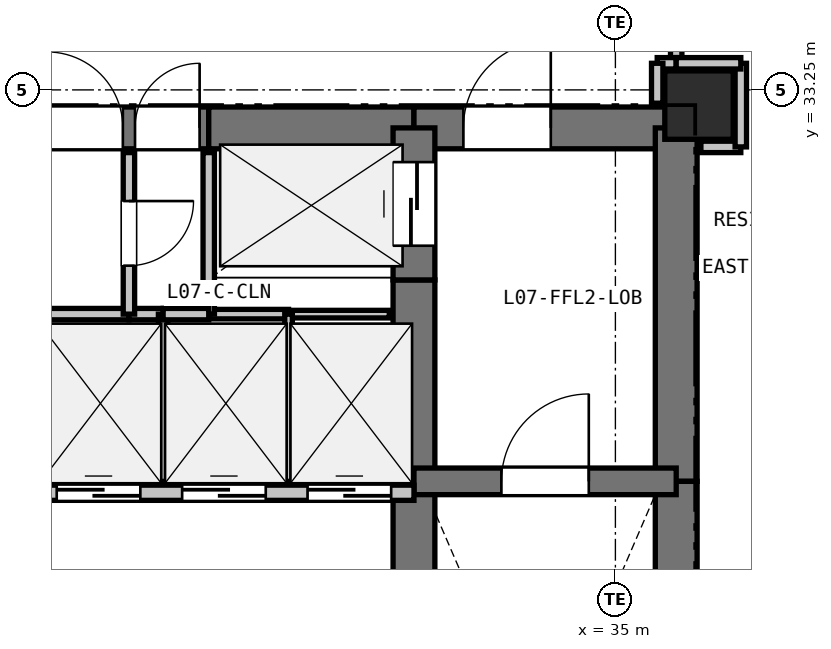
"""IFC4 building model, lengths in metres.
Left out: names, types, materials, properties, quantities, classifications, styles, units other than length and angle.
Written with IfcOpenShell. Run it as: python <this file> out.ifc"""

import sys

from ifc_helpers import new_model, si_unit, direction, frame, frame_2d, origin, origin_2d, place, context, subcontext, project, spatial, rectangle, extrude, element, fill, save


model = new_model("IFC4")
c1 = context("Model", 3, precision=1e-05, world=origin(), true_north=direction((0.0, 1.0)))
c2 = subcontext(c1, "Body", "Model", "MODEL_VIEW")
j1 = project(units=[si_unit("LENGTHUNIT", "METRE"), si_unit("PLANEANGLEUNIT", "RADIAN")], contexts=[c1])
p1 = place(None, origin())
s1 = spatial("IfcSite", under=j1, at=p1, CompositionType="ELEMENT")
p2 = place(p1, origin())
s2 = spatial("IfcBuilding", under=s1, at=p2, CompositionType="ELEMENT")
p3 = place(p2, frame((0.0, 0.0, 29.1)))
s3 = spatial("IfcBuildingStorey", under=s2, at=p3, CompositionType="ELEMENT", Elevation=29.1)
p4 = place(p3, frame((36.1, 33.05, 0.0), z_axis=(0.0, 0.0, 1.0), x_axis=(1.0, 0.0, 0.0)))
e1 = element("IfcColumn", 1, at=p4, inside=s3, PredefinedType="COLUMN", context=c2, shape_type="SweptSolid", body=[
    extrude(rectangle(XDim=0.9, YDim=0.9, at=origin_2d()), origin(), (0.0, 0.0, 1.0), 3.3),
])
p5 = place(p3, frame((27.4, 32.75, 0.0), z_axis=(0.0, 0.0, 1.0), x_axis=(1.0, 0.0, 0.0)))
e2 = element("IfcWall", 2, at=p5, inside=s3, PredefinedType="SHEAR", context=c2, shape_type="SweptSolid", body=[
    extrude(rectangle(XDim=2.25, YDim=0.55, at=frame_2d((1.125, 0.0))), origin(), (0.0, 0.0, 1.0), 3.04),
])
p6 = place(p5, frame((0.12, 0.0, 0.0)))
e3 = element("IfcOpeningElement", 3, at=p6, cuts=e2, PredefinedType="OPENING", context=c2, shape_type="SweptSolid", body=[
    extrude(rectangle(XDim=1.0, YDim=2.15, at=frame_2d((0.5, 1.075))), frame((0.0, 0.285, 0.0), z_axis=(0.0, -1.0, 0.0), x_axis=(1.0, 0.0, 0.0)), (0.0, 0.0, 1.0), 0.57),
])
p7 = place(p5, frame((1.28, 0.0, 0.0)))
e4 = element("IfcOpeningElement", 4, at=p7, cuts=e2, PredefinedType="OPENING", context=c2, shape_type="SweptSolid", body=[
    extrude(rectangle(XDim=0.85, YDim=2.1, at=frame_2d((0.425, 1.05))), frame((0.0, 0.285, 0.0), z_axis=(0.0, -1.0, 0.0), x_axis=(1.0, 0.0, 0.0)), (0.0, 0.0, 1.0), 0.57),
])
p8 = place(p3, frame((29.65, 32.75, 0.0), z_axis=(0.0, 0.0, 1.0), x_axis=(1.0, 0.0, 0.0)))
e5 = element("IfcWall", 5, at=p8, inside=s3, PredefinedType="SHEAR", context=c2, shape_type="SweptSolid", body=[
    extrude(rectangle(XDim=2.7, YDim=0.55, at=frame_2d((1.35, 0.0))), origin(), (0.0, 0.0, 1.0), 3.04),
])
p9 = place(p3, frame((32.35, 32.75, 0.0), z_axis=(0.0, 0.0, 1.0), x_axis=(1.0, 0.0, 0.0)))
e6 = element("IfcWall", 6, at=p9, inside=s3, PredefinedType="SHEAR", context=c2, shape_type="SweptSolid", body=[
    extrude(rectangle(XDim=3.45, YDim=0.55, at=frame_2d((1.725, 0.0))), origin(), (0.0, 0.0, 1.0), 3.04),
])
p10 = place(p9, frame((0.65, 0.0, 0.0)))
e7 = element("IfcOpeningElement", 7, at=p10, cuts=e6, PredefinedType="OPENING", context=c2, shape_type="SweptSolid", body=[
    extrude(rectangle(XDim=1.15, YDim=2.15, at=frame_2d((0.575, 1.075))), frame((0.0, 0.285, 0.0), z_axis=(0.0, -1.0, 0.0), x_axis=(1.0, 0.0, 0.0)), (0.0, 0.0, 1.0), 0.57),
])
p11 = place(p3, frame((35.8, 32.75, 0.0), z_axis=(0.0, 0.0, 1.0), x_axis=(0.0, -1.0, 0.0)))
e8 = element("IfcWall", 8, at=p11, inside=s3, PredefinedType="SHEAR", context=c2, shape_type="SweptSolid", body=[
    extrude(rectangle(XDim=4.65, YDim=0.55, at=frame_2d((2.325, 0.0))), origin(), (0.0, 0.0, 1.0), 3.04),
])
p12 = place(p3, frame((35.8, 28.1, 0.0), z_axis=(0.0, 0.0, 1.0), x_axis=(0.0, -1.0, 0.0)))
e9 = element("IfcWall", 9, at=p12, inside=s3, PredefinedType="SHEAR", context=c2, shape_type="SweptSolid", body=[
    extrude(rectangle(XDim=7.35, YDim=0.55, at=frame_2d((3.675, 0.0))), origin(), (0.0, 0.0, 1.0), 3.04),
])
p13 = place(p3, frame((32.35, 25.55, 0.0), z_axis=(0.0, 0.0, 1.0), x_axis=(0.0, 1.0, 0.0)))
e10 = element("IfcWall", 10, at=p13, inside=s3, PredefinedType="SHEAR", context=c2, shape_type="SweptSolid", body=[
    extrude(rectangle(XDim=2.4, YDim=0.55, at=frame_2d((1.2, 0.0))), origin(), (0.0, 0.0, 1.0), 3.04),
])
p14 = place(p3, frame((32.35, 27.95, 0.0), z_axis=(0.0, 0.0, 1.0), x_axis=(0.0, 1.0, 0.0)))
e11 = element("IfcWall", 11, at=p14, inside=s3, PredefinedType="SHEAR", context=c2, shape_type="SweptSolid", body=[
    extrude(rectangle(XDim=2.8, YDim=0.55, at=frame_2d((1.4, 0.0))), origin(), (0.0, 0.0, 1.0), 3.04),
])
p15 = place(p3, frame((32.35, 30.75, 0.0), z_axis=(0.0, 0.0, 1.0), x_axis=(0.0, 1.0, 0.0)))
e12 = element("IfcWall", 12, at=p15, inside=s3, PredefinedType="SHEAR", context=c2, shape_type="SweptSolid", body=[
    extrude(rectangle(XDim=2.0, YDim=0.55, at=frame_2d((1.0, 0.0))), origin(), (0.0, 0.0, 1.0), 3.04),
])
p16 = place(p15, frame((0.45, 0.0, 0.0)))
e13 = element("IfcOpeningElement", 13, at=p16, cuts=e12, PredefinedType="OPENING", context=c2, shape_type="SweptSolid", body=[
    extrude(rectangle(XDim=1.1, YDim=2.15, at=frame_2d((0.55, 1.075))), frame((0.0, 0.285, 0.0), z_axis=(0.0, -1.0, 0.0), x_axis=(1.0, 0.0, 0.0)), (0.0, 0.0, 1.0), 0.57),
])
p17 = place(p3, frame((32.35, 28.1, 0.0), z_axis=(0.0, 0.0, 1.0), x_axis=(1.0, 0.0, 0.0)))
e14 = element("IfcWall", 14, at=p17, inside=s3, PredefinedType="SHEAR", context=c2, shape_type="SweptSolid", body=[
    extrude(rectangle(XDim=3.45, YDim=0.35, at=frame_2d((1.725, 0.0))), origin(), (0.0, 0.0, 1.0), 3.04),
])
p18 = place(p17, frame((1.15, 0.0, 0.0)))
e15 = element("IfcOpeningElement", 15, at=p18, cuts=e14, PredefinedType="OPENING", context=c2, shape_type="SweptSolid", body=[
    extrude(rectangle(XDim=1.15, YDim=2.15, at=frame_2d((0.575, 1.075))), frame((0.0, 0.185, 0.0), z_axis=(0.0, -1.0, 0.0), x_axis=(1.0, 0.0, 0.0)), (0.0, 0.0, 1.0), 0.37),
])
p19 = place(p3, frame((27.4, 27.95, 0.0), z_axis=(0.0, 0.0, 1.0), x_axis=(1.0, 0.0, 0.0)))
e16 = element("IfcWall", 16, at=p19, inside=s3, PredefinedType="PARTITIONING", context=c2, shape_type="SweptSolid", body=[
    extrude(rectangle(XDim=4.95, YDim=0.2, at=frame_2d((2.475, 0.0))), origin(), (0.0, 0.0, 1.0), 3.04),
])
p20 = place(p19, frame((0.25, 0.0, 0.0)))
e17 = element("IfcOpeningElement", 17, at=p20, cuts=e16, PredefinedType="OPENING", context=c2, shape_type="SweptSolid", body=[
    extrude(rectangle(XDim=1.1, YDim=2.15, at=frame_2d((0.55, 1.075))), frame((0.0, 0.11, 0.0), z_axis=(0.0, -1.0, 0.0), x_axis=(1.0, 0.0, 0.0)), (0.0, 0.0, 1.0), 0.22),
])
p21 = place(p19, frame((1.9, 0.0, 0.0)))
e18 = element("IfcOpeningElement", 18, at=p21, cuts=e16, PredefinedType="OPENING", context=c2, shape_type="SweptSolid", body=[
    extrude(rectangle(XDim=1.1, YDim=2.15, at=frame_2d((0.55, 1.075))), frame((0.0, 0.11, 0.0), z_axis=(0.0, -1.0, 0.0), x_axis=(1.0, 0.0, 0.0)), (0.0, 0.0, 1.0), 0.22),
])
p22 = place(p19, frame((3.55, 0.0, 0.0)))
e19 = element("IfcOpeningElement", 19, at=p22, cuts=e16, PredefinedType="OPENING", context=c2, shape_type="SweptSolid", body=[
    extrude(rectangle(XDim=1.1, YDim=2.15, at=frame_2d((0.55, 1.075))), frame((0.0, 0.11, 0.0), z_axis=(0.0, -1.0, 0.0), x_axis=(1.0, 0.0, 0.0)), (0.0, 0.0, 1.0), 0.22),
])
p23 = place(p3, frame((32.025, 30.3, 0.0), z_axis=(0.0, 0.0, 1.0), x_axis=(-1.0, 0.0, 0.0)))
e20 = element("IfcWall", 20, at=p23, inside=s3, PredefinedType="PARTITIONING", context=c2, shape_type="SweptSolid", body=[
    extrude(rectangle(XDim=1.325, YDim=0.1, at=frame_2d((0.663, 0.0))), origin(), (0.0, 0.0, 1.0), 3.04),
])
p24 = place(p3, frame((30.7, 30.3, 0.0), z_axis=(0.0, 0.0, 1.0), x_axis=(-1.0, 0.0, 0.0)))
e21 = element("IfcWall", 21, at=p24, inside=s3, PredefinedType="PARTITIONING", context=c2, shape_type="SweptSolid", body=[
    extrude(rectangle(XDim=1.05, YDim=0.125, at=frame_2d((0.525, 0.0))), origin(), (0.0, 0.0, 1.0), 3.04),
])
p25 = place(p3, frame((29.65, 30.3, 0.0), z_axis=(0.0, 0.0, 1.0), x_axis=(0.0, 1.0, 0.0)))
e22 = element("IfcWall", 22, at=p25, inside=s3, PredefinedType="PARTITIONING", context=c2, shape_type="SweptSolid", body=[
    extrude(rectangle(XDim=2.125, YDim=0.15, at=frame_2d((1.062, 0.0))), origin(), (0.0, 0.0, 1.0), 3.04),
])
p26 = place(p3, frame((27.4, 30.3, 0.0), z_axis=(0.0, 0.0, 1.0), x_axis=(1.0, 0.0, 0.0)))
e23 = element("IfcWall", 23, at=p26, inside=s3, PredefinedType="PARTITIONING", context=c2, shape_type="SweptSolid", body=[
    extrude(rectangle(XDim=1.2, YDim=0.15, at=frame_2d((0.6, 0.0))), origin(), (0.0, 0.0, 1.0), 3.04),
])
p27 = place(p3, frame((28.6, 30.3, 0.0), z_axis=(0.0, 0.0, 1.0), x_axis=(1.0, 0.0, 0.0)))
e24 = element("IfcWall", 24, at=p27, inside=s3, PredefinedType="PARTITIONING", context=c2, shape_type="SweptSolid", body=[
    extrude(rectangle(XDim=0.45, YDim=0.15, at=frame_2d((0.225, 0.0))), origin(), (0.0, 0.0, 1.0), 3.04),
])
p28 = place(p3, frame((29.05, 30.3, 0.0), z_axis=(0.0, 0.0, 1.0), x_axis=(0.0, -1.0, 0.0)))
e25 = element("IfcWall", 25, at=p28, inside=s3, PredefinedType="PARTITIONING", context=c2, shape_type="SweptSolid", body=[
    extrude(rectangle(XDim=2.2, YDim=0.125, at=frame_2d((1.1, 0.0))), origin(), (0.0, 0.0, 1.0), 3.04),
])
p29 = place(p3, frame((29.05, 30.3, 0.0), z_axis=(0.0, 0.0, 1.0), x_axis=(1.0, 0.0, 0.0)))
e26 = element("IfcWall", 26, at=p29, inside=s3, PredefinedType="PARTITIONING", context=c2, shape_type="SweptSolid", body=[
    extrude(rectangle(XDim=0.6, YDim=0.15, at=frame_2d((0.3, 0.0))), origin(), (0.0, 0.0, 1.0), 3.04),
])
p30 = place(p3, frame((30.7, 30.3, 0.0), z_axis=(0.0, 0.0, 1.0), x_axis=(0.0, -1.0, 0.0)))
e27 = element("IfcWall", 27, at=p30, inside=s3, PredefinedType="PARTITIONING", context=c2, shape_type="SweptSolid", body=[
    extrude(rectangle(XDim=2.2, YDim=0.1, at=frame_2d((1.1, 0.0))), origin(), (0.0, 0.0, 1.0), 3.04),
])
p31 = place(p3, frame((28.6, 32.425, 0.0), z_axis=(0.0, 0.0, 1.0), x_axis=(0.0, -1.0, 0.0)))
e28 = element("IfcWall", 28, at=p31, inside=s3, PredefinedType="PARTITIONING", context=c2, shape_type="SweptSolid", body=[
    extrude(rectangle(XDim=2.125, YDim=0.15, at=frame_2d((1.062, 0.0))), origin(), (0.0, 0.0, 1.0), 3.04),
])
p32 = place(p31, frame((0.637, 0.0, 0.0)))
e29 = element("IfcOpeningElement", 29, at=p32, cuts=e28, PredefinedType="OPENING", context=c2, shape_type="SweptSolid", body=[
    extrude(rectangle(XDim=0.85, YDim=2.1, at=frame_2d((0.425, 1.05))), frame((0.0, 0.085, 0.0), z_axis=(0.0, -1.0, 0.0), x_axis=(1.0, 0.0, 0.0)), (0.0, 0.0, 1.0), 0.17),
])
p33 = place(p3, frame((35.8, 35.35, 0.0), z_axis=(0.0, 0.0, 1.0), x_axis=(0.0, -1.0, 0.0)))
e30 = element("IfcWall", 30, at=p33, inside=s3, PredefinedType="PARTITIONING", context=c2, shape_type="SweptSolid", body=[
    extrude(rectangle(XDim=1.75, YDim=0.15, at=frame_2d((0.875, 0.0))), origin(), (0.0, 0.0, 1.0), 3.04),
])
p34 = place(p33, frame((0.375, 0.0, 0.0)))
e31 = element("IfcOpeningElement", 31, at=p34, cuts=e30, PredefinedType="OPENING", context=c2, shape_type="SweptSolid", body=[
    extrude(rectangle(XDim=1.0, YDim=2.15, at=frame_2d((0.5, 1.075))), frame((0.0, 0.085, 0.0), z_axis=(0.0, -1.0, 0.0), x_axis=(1.0, 0.0, 0.0)), (0.0, 0.0, 1.0), 0.17),
])
p35 = place(p3, frame((35.8, 33.6, 0.0), z_axis=(0.0, 0.0, 1.0), x_axis=(-1.0, 0.0, 0.0)))
e32 = element("IfcWall", 32, at=p35, inside=s3, PredefinedType="PARTITIONING", context=c2, shape_type="SweptSolid", body=[
    extrude(rectangle(XDim=0.25, YDim=0.15, at=frame_2d((0.125, 0.0))), origin(), (0.0, 0.0, 1.0), 3.04),
])
p36 = place(p3, frame((35.55, 33.6, 0.0), z_axis=(0.0, 0.0, 1.0), x_axis=(0.0, -1.0, 0.0)))
e33 = element("IfcWall", 33, at=p36, inside=s3, PredefinedType="PARTITIONING", context=c2, shape_type="SweptSolid", body=[
    extrude(rectangle(XDim=0.525, YDim=0.15, at=frame_2d((0.263, 0.0))), origin(), (0.0, 0.0, 1.0), 2.488),
])
p37 = place(p3, frame((36.125, 32.5, 0.0), z_axis=(0.0, 0.0, 1.0), x_axis=(1.0, 0.0, 0.0)))
e34 = element("IfcWall", 34, at=p37, inside=s3, PredefinedType="PARTITIONING", context=c2, shape_type="SweptSolid", body=[
    extrude(rectangle(XDim=0.525, YDim=0.15, at=frame_2d((0.262, 0.0))), origin(), (0.0, 0.0, 1.0), 2.488),
])
p38 = place(p3, frame((36.65, 32.5, 0.0), z_axis=(0.0, 0.0, 1.0), x_axis=(0.0, 1.0, 0.0)))
e35 = element("IfcWall", 35, at=p38, inside=s3, PredefinedType="PARTITIONING", context=c2, shape_type="SweptSolid", body=[
    extrude(rectangle(XDim=1.1, YDim=0.15, at=frame_2d((0.55, 0.0))), origin(), (0.0, 0.0, 1.0), 2.337),
])
p39 = place(p3, frame((36.65, 33.6, 0.0), z_axis=(0.0, 0.0, 1.0), x_axis=(-1.0, 0.0, 0.0)))
e36 = element("IfcWall", 36, at=p39, inside=s3, PredefinedType="PARTITIONING", context=c2, shape_type="SweptSolid", body=[
    extrude(rectangle(XDim=0.85, YDim=0.15, at=frame_2d((0.425, 0.0))), origin(), (0.0, 0.0, 1.0), 2.337),
])
p40 = place(p20, origin())
e37 = element("IfcDoor", 37, at=p40, inside=s3, OperationType="SLIDING_TO_LEFT", PredefinedType="DOOR", context=c2, shape_type="SweptSolid", body=[
    extrude(rectangle(XDim=1.1, YDim=2.15, at=frame_2d((0.55, 1.075))), frame((0.0, 0.025, 0.0), z_axis=(0.0, -1.0, 0.0), x_axis=(1.0, 0.0, 0.0)), (0.0, 0.0, 1.0), 0.05),
])
fill(e17, e37)
p41 = place(p21, origin())
e38 = element("IfcDoor", 38, at=p41, inside=s3, OperationType="SLIDING_TO_LEFT", PredefinedType="DOOR", context=c2, shape_type="SweptSolid", body=[
    extrude(rectangle(XDim=1.1, YDim=2.15, at=frame_2d((0.55, 1.075))), frame((0.0, 0.025, 0.0), z_axis=(0.0, -1.0, 0.0), x_axis=(1.0, 0.0, 0.0)), (0.0, 0.0, 1.0), 0.05),
])
fill(e18, e38)
p42 = place(p22, origin())
e39 = element("IfcDoor", 39, at=p42, inside=s3, OperationType="SLIDING_TO_LEFT", PredefinedType="DOOR", context=c2, shape_type="SweptSolid", body=[
    extrude(rectangle(XDim=1.1, YDim=2.15, at=frame_2d((0.55, 1.075))), frame((0.0, 0.025, 0.0), z_axis=(0.0, -1.0, 0.0), x_axis=(1.0, 0.0, 0.0)), (0.0, 0.0, 1.0), 0.05),
])
fill(e19, e39)
p43 = place(p16, origin())
e40 = element("IfcDoor", 40, at=p43, inside=s3, OperationType="SLIDING_TO_LEFT", PredefinedType="DOOR", context=c2, shape_type="SweptSolid", body=[
    extrude(rectangle(XDim=1.1, YDim=2.15, at=frame_2d((0.55, 1.075))), frame((0.0, 0.025, 0.0), z_axis=(0.0, -1.0, 0.0), x_axis=(1.0, 0.0, 0.0)), (0.0, 0.0, 1.0), 0.05),
])
fill(e13, e40)
p44 = place(p18, origin())
e41 = element("IfcDoor", 41, at=p44, inside=s3, OperationType="SINGLE_SWING_RIGHT", PredefinedType="DOOR", context=c2, shape_type="SweptSolid", body=[
    extrude(rectangle(XDim=1.15, YDim=2.15, at=frame_2d((0.575, 1.075))), frame((0.0, 0.025, 0.0), z_axis=(0.0, -1.0, 0.0), x_axis=(1.0, 0.0, 0.0)), (0.0, 0.0, 1.0), 0.05),
])
fill(e15, e41)
p45 = place(p10, origin())
e42 = element("IfcDoor", 42, at=p45, inside=s3, OperationType="SINGLE_SWING_RIGHT", PredefinedType="DOOR", context=c2, shape_type="SweptSolid", body=[
    extrude(rectangle(XDim=1.15, YDim=2.15, at=frame_2d((0.575, 1.075))), frame((0.0, 0.025, 0.0), z_axis=(0.0, -1.0, 0.0), x_axis=(1.0, 0.0, 0.0)), (0.0, 0.0, 1.0), 0.05),
])
fill(e7, e42)
p46 = place(p6, origin())
e43 = element("IfcDoor", 43, at=p46, inside=s3, OperationType="SINGLE_SWING_LEFT", PredefinedType="DOOR", context=c2, shape_type="SweptSolid", body=[
    extrude(rectangle(XDim=1.0, YDim=2.15, at=frame_2d((0.5, 1.075))), frame((0.0, 0.025, 0.0), z_axis=(0.0, -1.0, 0.0), x_axis=(1.0, 0.0, 0.0)), (0.0, 0.0, 1.0), 0.05),
])
fill(e3, e43)
p47 = place(p32, origin())
e44 = element("IfcDoor", 44, at=p47, inside=s3, OperationType="SINGLE_SWING_LEFT", PredefinedType="DOOR", context=c2, shape_type="SweptSolid", body=[
    extrude(rectangle(XDim=0.85, YDim=2.1, at=frame_2d((0.425, 1.05))), frame((0.0, 0.025, 0.0), z_axis=(0.0, -1.0, 0.0), x_axis=(1.0, 0.0, 0.0)), (0.0, 0.0, 1.0), 0.05),
])
fill(e29, e44)
p48 = place(p7, origin())
e45 = element("IfcDoor", 45, at=p48, inside=s3, OperationType="SINGLE_SWING_RIGHT", PredefinedType="DOOR", context=c2, shape_type="SweptSolid", body=[
    extrude(rectangle(XDim=0.85, YDim=2.1, at=frame_2d((0.425, 1.05))), frame((0.0, 0.025, 0.0), z_axis=(0.0, -1.0, 0.0), x_axis=(1.0, 0.0, 0.0)), (0.0, 0.0, 1.0), 0.05),
])
fill(e4, e45)
save(model, sys.argv[1])
